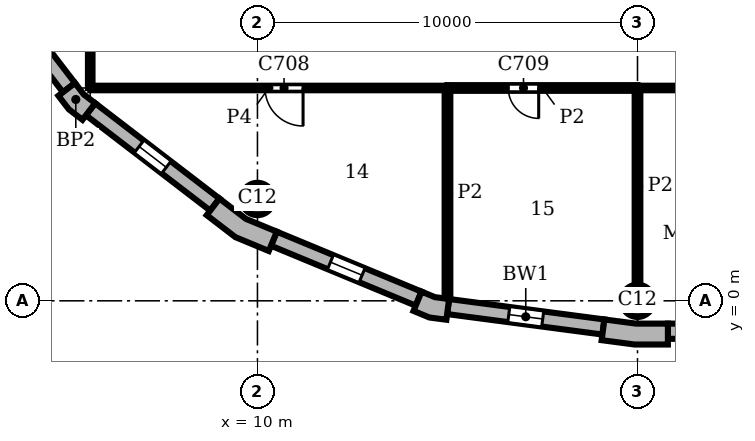
"""IFC4 building model, lengths in metres.
Left out: names, types, materials, properties, quantities, classifications, styles, units other than length and angle.
Written with IfcOpenShell. Run it as: python <this file> out.ifc"""

import sys

from ifc_helpers import new_model, si_unit, direction, frame, frame_2d, origin, origin_2d, place, context, subcontext, project, spatial, polyline, rectangle, circle, outline, extrude, element, fill, save


model = new_model("IFC4")
c1 = context("Model", 3, precision=1e-05, world=origin(), true_north=direction((0.0, 1.0)))
c2 = subcontext(c1, "Body", "Model", "MODEL_VIEW")
j1 = project(units=[si_unit("LENGTHUNIT", "METRE"), si_unit("PLANEANGLEUNIT", "RADIAN")], contexts=[c1])
p1 = place(None, origin())
s1 = spatial("IfcSite", under=j1, at=p1, CompositionType="ELEMENT")
p2 = place(p1, origin())
s2 = spatial("IfcBuilding", under=s1, at=p2, CompositionType="ELEMENT")
p3 = place(p2, frame((0.0, 0.0, 306.0)))
s3 = spatial("IfcBuildingStorey", under=s2, at=p3, CompositionType="ELEMENT", Elevation=306.0)
for number, where, z_axis, x_axis in (
    (1, (20.0, 0.0, 0.0), (0.0, 0.0, 1.0), (1.0, 0.0, 0.0)),
    (2, (10.0, 2.679, 0.0), (0.0, 0.0, 1.0), (1.0, 0.0, 0.0)),
):
    element("IfcColumn", number, at=place(p3, frame(where, z_axis=z_axis, x_axis=x_axis)), inside=s3, PredefinedType="COLUMN", context=c2, shape_type="SweptSolid", body=[
        extrude(circle(Radius=0.425, at=origin_2d()), origin(), (0.0, 0.0, 1.0), 3.9),
    ])
p4 = place(p3, origin())
e3 = element("IfcWall", 3, at=p4, inside=s3, PredefinedType="SOLIDWALL", context=c2, shape_type="SweptSolid", body=[
    extrude(outline(polyline([(19.076, -0.887), (19.057, -1.036), (19.925, -1.15), (20.8, -1.15), (20.8, -1.0), (20.8, -0.6), (19.961, -0.6), (19.128, -0.49), (19.076, -0.887)])), origin(), (0.0, 0.0, 1.0), 3.9),
])
e4 = element("IfcWall", 4, at=p4, inside=s3, PredefinedType="SOLIDWALL", context=c2, shape_type="SweptSolid", body=[
    extrude(outline(polyline([(4.882, 5.487), (4.763, 5.396), (5.038, 5.038), (5.396, 4.763), (5.487, 4.882), (5.731, 5.199), (5.43, 5.43), (5.199, 5.731), (4.882, 5.487)])), origin(), (0.0, 0.0, 1.0), 3.9),
])
e5 = element("IfcWall", 5, at=p4, inside=s3, PredefinedType="SOLIDWALL", context=c2, shape_type="SweptSolid", body=[
    extrude(outline(polyline([(8.757, 2.373), (8.665, 2.254), (9.42, 1.675), (10.299, 1.311), (10.356, 1.449), (10.51, 1.819), (9.698, 2.155), (9.0, 2.69), (8.757, 2.373)])), origin(), (0.0, 0.0, 1.0), 3.9),
])
e6 = element("IfcWall", 6, at=p4, inside=s3, PredefinedType="SOLIDWALL", context=c2, shape_type="SweptSolid", body=[
    extrude(outline(polyline([(14.164, -0.128), (14.106, -0.266), (14.523, -0.439), (14.971, -0.498), (14.99, -0.349), (15.043, 0.047), (14.667, 0.097), (14.317, 0.242), (14.164, -0.128)])), origin(), (0.0, 0.0, 1.0), 3.9),
])
p5 = place(p3, frame((20.8, -0.8, 0.0), z_axis=(0.0, 0.0, 1.0), x_axis=(1.0, 0.0, 0.0)))
e7 = element("IfcWall", 7, at=p5, inside=s3, PredefinedType="SOLIDWALL", context=c2, shape_type="SweptSolid", body=[
    extrude(rectangle(XDim=18.4, YDim=0.4, at=frame_2d((9.2, 0.0))), origin(), (0.0, 0.0, 1.0), 3.9),
])
p6 = place(p5, frame((3.75, 0.0, 0.9)))
e8 = element("IfcOpeningElement", 8, at=p6, cuts=e7, PredefinedType="OPENING", context=c2, shape_type="SweptSolid", body=[
    extrude(rectangle(XDim=0.9, YDim=2.35, at=frame_2d((0.45, 1.175))), frame((0.0, 0.21, 0.0), z_axis=(0.0, -1.0, 0.0), x_axis=(1.0, 0.0, 0.0)), (0.0, 0.0, 1.0), 0.42),
])
p7 = place(p5, frame((13.75, 0.0, 0.9)))
e9 = element("IfcOpeningElement", 9, at=p7, cuts=e7, PredefinedType="OPENING", context=c2, shape_type="SweptSolid", body=[
    extrude(rectangle(XDim=0.9, YDim=2.35, at=frame_2d((0.45, 1.175))), frame((0.0, 0.21, 0.0), z_axis=(0.0, -1.0, 0.0), x_axis=(1.0, 0.0, 0.0)), (0.0, 0.0, 1.0), 0.42),
])
p8 = place(p3, frame((2.532, 8.878, 0.0), z_axis=(0.0, 0.0, 1.0), x_axis=(0.608759824817, -0.793354571229, 0.0)))
e10 = element("IfcWall", 10, at=p8, inside=s3, PredefinedType="SOLIDWALL", context=c2, shape_type="SweptSolid", body=[
    extrude(rectangle(XDim=4.121, YDim=0.4, at=frame_2d((2.061, 0.0))), origin(), (0.0, 0.0, 1.0), 3.9),
])
p9 = place(p8, frame((1.611, 0.0, 0.9)))
e11 = element("IfcOpeningElement", 11, at=p9, cuts=e10, PredefinedType="OPENING", context=c2, shape_type="SweptSolid", body=[
    extrude(rectangle(XDim=0.9, YDim=2.35, at=frame_2d((0.45, 1.175))), frame((0.0, 0.21, 0.0), z_axis=(0.0, -1.0, 0.0), x_axis=(1.0, 0.0, 0.0)), (0.0, 0.0, 1.0), 0.42),
])
p10 = place(p3, frame((5.609, 5.041, 0.0), z_axis=(0.0, 0.0, 1.0), x_axis=(0.793354571229, -0.608759824817, 0.0)))
e12 = element("IfcWall", 12, at=p10, inside=s3, PredefinedType="SOLIDWALL", context=c2, shape_type="SweptSolid", body=[
    extrude(rectangle(XDim=4.121, YDim=0.4, at=frame_2d((2.061, 0.0))), origin(), (0.0, 0.0, 1.0), 3.9),
])
p11 = place(p10, frame((1.611, 0.0, 0.9)))
e13 = element("IfcOpeningElement", 13, at=p11, cuts=e12, PredefinedType="OPENING", context=c2, shape_type="SweptSolid", body=[
    extrude(rectangle(XDim=0.9, YDim=2.35, at=frame_2d((0.45, 1.175))), frame((0.0, 0.21, 0.0), z_axis=(0.0, -1.0, 0.0), x_axis=(1.0, 0.0, 0.0)), (0.0, 0.0, 1.0), 0.42),
])
p12 = place(p3, frame((10.433, 1.634, 0.0), z_axis=(0.0, 0.0, 1.0), x_axis=(0.923863744394, -0.382721546029, 0.0)))
e14 = element("IfcWall", 14, at=p12, inside=s3, PredefinedType="SOLIDWALL", context=c2, shape_type="SweptSolid", body=[
    extrude(rectangle(XDim=4.121, YDim=0.4, at=frame_2d((2.061, 0.0))), origin(), (0.0, 0.0, 1.0), 3.9),
])
p13 = place(p12, frame((1.611, 0.0, 0.9)))
e15 = element("IfcOpeningElement", 15, at=p13, cuts=e14, PredefinedType="OPENING", context=c2, shape_type="SweptSolid", body=[
    extrude(rectangle(XDim=0.9, YDim=2.35, at=frame_2d((0.45, 1.175))), frame((0.0, 0.21, 0.0), z_axis=(0.0, -1.0, 0.0), x_axis=(1.0, 0.0, 0.0)), (0.0, 0.0, 1.0), 0.42),
])
p14 = place(p3, frame((15.017, -0.151, 0.0), z_axis=(0.0, 0.0, 1.0), x_axis=(0.991446429508, -0.130514280502, 0.0)))
e16 = element("IfcWall", 16, at=p14, inside=s3, PredefinedType="SOLIDWALL", context=c2, shape_type="SweptSolid", body=[
    extrude(rectangle(XDim=4.121, YDim=0.4, at=frame_2d((2.061, 0.0))), origin(), (0.0, 0.0, 1.0), 3.9),
])
p15 = place(p14, frame((1.611, 0.0, 0.9)))
e17 = element("IfcOpeningElement", 17, at=p15, cuts=e16, PredefinedType="OPENING", context=c2, shape_type="SweptSolid", body=[
    extrude(rectangle(XDim=0.9, YDim=2.35, at=frame_2d((0.45, 1.175))), frame((0.0, 0.21, 0.0), z_axis=(0.0, -1.0, 0.0), x_axis=(1.0, 0.0, 0.0)), (0.0, 0.0, 1.0), 0.42),
])
p16 = place(p3, frame((15.0, 0.063, 0.0), z_axis=(0.0, 0.0, 1.0), x_axis=(0.0, 1.0, 0.0)))
e18 = element("IfcWall", 18, at=p16, inside=s3, PredefinedType="PARTITIONING", context=c2, shape_type="SweptSolid", body=[
    extrude(rectangle(XDim=5.537, YDim=0.15, at=frame_2d((2.769, 0.0))), origin(), (0.0, 0.0, 1.0), 3.58),
])
p17 = place(p3, frame((20.0, 0.425, 0.0), z_axis=(0.0, 0.0, 1.0), x_axis=(0.0, 1.0, 0.0)))
e19 = element("IfcWall", 19, at=p17, inside=s3, PredefinedType="PARTITIONING", context=c2, shape_type="SweptSolid", body=[
    extrude(rectangle(XDim=5.175, YDim=0.15, at=frame_2d((2.587, 0.0))), origin(), (0.0, 0.0, 1.0), 3.58),
])
p18 = place(p3, frame((15.0, 5.6, 0.0), z_axis=(0.0, 0.0, 1.0), x_axis=(1.0, 0.0, 0.0)))
e20 = element("IfcWall", 20, at=p18, inside=s3, PredefinedType="PARTITIONING", context=c2, shape_type="SweptSolid", body=[
    extrude(rectangle(XDim=5.0, YDim=0.15, at=frame_2d((2.5, 0.0))), origin(), (0.0, 0.0, 1.0), 3.58),
])
p19 = place(p18, frame((1.6, 0.0, 0.0)))
e21 = element("IfcOpeningElement", 21, at=p19, cuts=e20, PredefinedType="OPENING", context=c2, shape_type="SweptSolid", body=[
    extrude(rectangle(XDim=0.8, YDim=2.1, at=frame_2d((0.4, 1.05))), frame((0.0, 0.085, 0.0), z_axis=(0.0, -1.0, 0.0), x_axis=(1.0, 0.0, 0.0)), (0.0, 0.0, 1.0), 0.17),
])
p20 = place(p3, frame((5.6, 5.6, 0.0), z_axis=(0.0, 0.0, 1.0), x_axis=(0.0, 1.0, 0.0)))
e22 = element("IfcWall", 22, at=p20, inside=s3, PredefinedType="PARTITIONING", context=c2, shape_type="SweptSolid", body=[
    extrude(rectangle(XDim=9.4, YDim=0.12, at=frame_2d((4.7, 0.0))), origin(), (0.0, 0.0, 1.0), 3.58),
])
p21 = place(p20, frame((5.35, 0.0, 0.0)))
e23 = element("IfcOpeningElement", 23, at=p21, cuts=e22, PredefinedType="OPENING", context=c2, shape_type="SweptSolid", body=[
    extrude(rectangle(XDim=1.0, YDim=2.1, at=frame_2d((0.5, 1.05))), frame((0.0, 0.07, 0.0), z_axis=(0.0, -1.0, 0.0), x_axis=(1.0, 0.0, 0.0)), (0.0, 0.0, 1.0), 0.14),
])
p22 = place(p3, frame((5.6, 5.6, 0.0), z_axis=(0.0, 0.0, 1.0), x_axis=(1.0, 0.0, 0.0)))
e24 = element("IfcWall", 24, at=p22, inside=s3, PredefinedType="PARTITIONING", context=c2, shape_type="SweptSolid", body=[
    extrude(rectangle(XDim=9.4, YDim=0.12, at=frame_2d((4.7, 0.0))), origin(), (0.0, 0.0, 1.0), 3.58),
])
p23 = place(p22, frame((4.6, 0.0, 0.0)))
e25 = element("IfcOpeningElement", 25, at=p23, cuts=e24, PredefinedType="OPENING", context=c2, shape_type="SweptSolid", body=[
    extrude(rectangle(XDim=1.0, YDim=2.1, at=frame_2d((0.5, 1.05))), frame((0.0, 0.07, 0.0), z_axis=(0.0, -1.0, 0.0), x_axis=(1.0, 0.0, 0.0)), (0.0, 0.0, 1.0), 0.14),
])
p24 = place(p3, frame((20.0, 5.6, 0.0), z_axis=(0.0, 0.0, 1.0), x_axis=(1.0, 0.0, 0.0)))
e26 = element("IfcWall", 26, at=p24, inside=s3, PredefinedType="PARTITIONING", context=c2, shape_type="SweptSolid", body=[
    extrude(rectangle(XDim=11.0, YDim=0.12, at=frame_2d((5.5, 0.0))), origin(), (0.0, 0.0, 1.0), 3.58),
])
p25 = place(p11, origin())
e27 = element("IfcWindow", 27, at=p25, inside=s3, PartitioningType="SINGLE_PANEL", PredefinedType="WINDOW", context=c2, shape_type="SweptSolid", body=[
    extrude(rectangle(XDim=0.9, YDim=2.35, at=frame_2d((0.45, 1.175))), frame((0.0, 0.16, 0.0), z_axis=(0.0, -1.0, 0.0), x_axis=(1.0, 0.0, 0.0)), (0.0, 0.0, 1.0), 0.06),
])
fill(e13, e27)
p26 = place(p13, origin())
e28 = element("IfcWindow", 28, at=p26, inside=s3, PartitioningType="SINGLE_PANEL", PredefinedType="WINDOW", context=c2, shape_type="SweptSolid", body=[
    extrude(rectangle(XDim=0.9, YDim=2.35, at=frame_2d((0.45, 1.175))), frame((0.0, 0.16, 0.0), z_axis=(0.0, -1.0, 0.0), x_axis=(1.0, 0.0, 0.0)), (0.0, 0.0, 1.0), 0.06),
])
fill(e15, e28)
p27 = place(p15, origin())
e29 = element("IfcWindow", 29, at=p27, inside=s3, PartitioningType="SINGLE_PANEL", PredefinedType="WINDOW", context=c2, shape_type="SweptSolid", body=[
    extrude(rectangle(XDim=0.9, YDim=2.35, at=frame_2d((0.45, 1.175))), frame((0.0, 0.16, 0.0), z_axis=(0.0, -1.0, 0.0), x_axis=(1.0, 0.0, 0.0)), (0.0, 0.0, 1.0), 0.06),
])
fill(e17, e29)
p28 = place(p23, frame((1.0, 0.0, 0.0), z_axis=(0.0, 0.0, 1.0), x_axis=(-1.0, 0.0, 0.0)))
e30 = element("IfcDoor", 30, at=p28, inside=s3, OperationType="SINGLE_SWING_LEFT", PredefinedType="DOOR", context=c2, shape_type="SweptSolid", body=[
    extrude(rectangle(XDim=1.0, YDim=2.1, at=frame_2d((0.5, 1.05))), frame((0.0, 0.025, 0.0), z_axis=(0.0, -1.0, 0.0), x_axis=(1.0, 0.0, 0.0)), (0.0, 0.0, 1.0), 0.05),
])
fill(e25, e30)
p29 = place(p19, frame((0.8, 0.0, 0.0), z_axis=(0.0, 0.0, 1.0), x_axis=(-1.0, 0.0, 0.0)))
e31 = element("IfcDoor", 31, at=p29, inside=s3, OperationType="SINGLE_SWING_LEFT", PredefinedType="DOOR", context=c2, shape_type="SweptSolid", body=[
    extrude(rectangle(XDim=0.8, YDim=2.1, at=frame_2d((0.4, 1.05))), frame((0.0, 0.025, 0.0), z_axis=(0.0, -1.0, 0.0), x_axis=(1.0, 0.0, 0.0)), (0.0, 0.0, 1.0), 0.05),
])
fill(e21, e31)
save(model, sys.argv[1])
